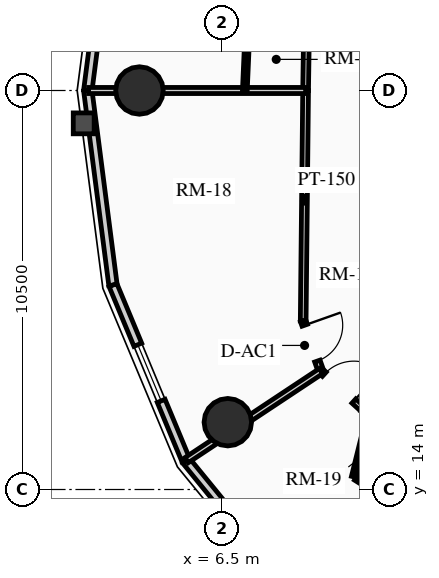
"""IFC4 building model, lengths in metres.
Left out: names, types, materials, properties, quantities, classifications, styles, units other than length and angle.
Written with IfcOpenShell. Run it as: python <this file> out.ifc"""

import sys

from ifc_helpers import new_model, si_unit, direction, frame, frame_2d, origin, origin_2d, place, context, subcontext, project, spatial, rectangle, circle, extrude, source, transform, mapped, element, fill, save


model = new_model("IFC4")
c1 = context("Model", 3, precision=1e-05, world=origin(), true_north=direction((0.0, 1.0)))
c2 = subcontext(c1, "Body", "Model", "MODEL_VIEW")
j1 = project(units=[si_unit("LENGTHUNIT", "METRE"), si_unit("PLANEANGLEUNIT", "RADIAN")], contexts=[c1])
p1 = place(None, origin())
s1 = spatial("IfcSite", under=j1, at=p1, CompositionType="ELEMENT")
p2 = place(p1, origin())
s2 = spatial("IfcBuilding", under=s1, at=p2, CompositionType="ELEMENT")
p3 = place(p2, frame((0.0, 0.0, 183.61)))
s3 = spatial("IfcBuildingStorey", under=s2, at=p3, CompositionType="ELEMENT", Elevation=183.61)
for number, where, z_axis, x_axis in (
    (1, (4.328, 24.5, 0.0), (0.0, 0.0, 1.0), (1.0, 0.0, 0.0)),
    (2, (6.653, 15.771, 0.0), (0.0, 0.0, 1.0), (1.0, 0.0, 0.0)),
):
    element("IfcColumn", number, at=place(p3, frame(where, z_axis=z_axis, x_axis=x_axis)), inside=s3, PredefinedType="USERDEFINED", context=c2, shape_type="SweptSolid", body=[
        extrude(circle(Radius=0.625, at=origin_2d()), origin(), (0.0, 0.0, 1.0), 2.91),
    ])
p4 = place(p3, frame((2.969, 24.5, 0.0), z_axis=(0.0, 0.0, 1.0), x_axis=(0.128287912609, 0.991736966881, 0.0)))
e3 = element("IfcWall", 3, at=p4, inside=s3, PredefinedType="SOLIDWALL", context=c2, shape_type="SweptSolid", body=[
    extrude(rectangle(XDim=5.163, YDim=0.22, at=frame_2d((2.582, 0.0))), origin(), (0.0, 0.0, 1.0), 2.245),
])
m1 = source(origin(), c2, "Body", "SweptSolid", [
    extrude(rectangle(XDim=1.6, YDim=1.3, at=frame_2d((0.8, 0.65))), frame((0.0, 0.12, 0.0), z_axis=(0.0, -1.0, 0.0), x_axis=(1.0, 0.0, 0.0)), (0.0, 0.0, 1.0), 0.24),
])
p5 = place(p4, frame((1.782, 0.0, 0.65)))
e4 = element("IfcOpeningElement", 4, at=p5, cuts=e3, PredefinedType="OPENING", context=c2, shape_type="MappedRepresentation", body=[
    mapped(m1, transform((0.0, 0.0, 0.0), x_axis=(1.0, 0.0, 0.0), y_axis=(0.0, 1.0, 0.0), z_axis=(0.0, 0.0, 1.0), scale=1.0)),
])
p6 = place(p3, frame((3.631, 19.38, 0.0), z_axis=(0.0, 0.0, 1.0), x_axis=(-0.128287912609, 0.991736966881, 0.0)))
e5 = element("IfcWall", 5, at=p6, inside=s3, PredefinedType="SOLIDWALL", context=c2, shape_type="SweptSolid", body=[
    extrude(rectangle(XDim=5.163, YDim=0.22, at=frame_2d((2.582, 0.0))), origin(), (0.0, 0.0, 1.0), 2.245),
])
p7 = place(p3, frame((5.553, 14.76, 0.0), z_axis=(0.0, 0.0, 1.0), x_axis=(-0.384144094086, 0.923273152961, 0.0)))
e6 = element("IfcWall", 6, at=p7, inside=s3, PredefinedType="SOLIDWALL", context=c2, shape_type="SweptSolid", body=[
    extrude(rectangle(XDim=5.003, YDim=0.22, at=frame_2d((2.501, 0.0))), origin(), (0.0, 0.0, 1.0), 2.245),
])
p8 = place(p7, frame((1.702, 0.0, 0.65)))
e7 = element("IfcOpeningElement", 7, at=p8, cuts=e6, PredefinedType="OPENING", context=c2, shape_type="MappedRepresentation", body=[
    mapped(m1, transform((0.0, 0.0, 0.0), x_axis=(1.0, 0.0, 0.0), y_axis=(0.0, 1.0, 0.0), z_axis=(0.0, 0.0, 1.0), scale=1.0)),
])
p9 = place(p3, frame((8.547, 11.094, 0.0), z_axis=(0.0, 0.0, 1.0), x_axis=(-0.632470615287, 0.774584353572, 0.0)))
e8 = element("IfcWall", 8, at=p9, inside=s3, PredefinedType="SOLIDWALL", context=c2, shape_type="SweptSolid", body=[
    extrude(rectangle(XDim=4.733, YDim=0.22, at=frame_2d((2.366, 0.0))), origin(), (0.0, 0.0, 1.0), 2.245),
])
p10 = place(p3, frame((8.791, 30.446, 0.0), z_axis=(0.0, 0.0, 1.0), x_axis=(-0.015230619426, -0.999884007389, 0.0)))
e9 = element("IfcWall", 9, at=p10, inside=s3, PredefinedType="PARTITIONING", context=c2, shape_type="SweptSolid", body=[
    extrude(rectangle(XDim=5.947, YDim=0.15, at=frame_2d((2.974, 0.0))), origin(), (0.0, 0.0, 1.0), 2.675),
])
p11 = place(p3, frame((8.7, 24.5, 0.0), z_axis=(0.0, 0.0, 1.0), x_axis=(-0.010507512335, -0.999944794568, 0.0)))
e10 = element("IfcWall", 10, at=p11, inside=s3, PredefinedType="PARTITIONING", context=c2, shape_type="SweptSolid", body=[
    extrude(rectangle(XDim=6.064, YDim=0.15, at=frame_2d((3.032, 0.0))), origin(), (0.0, 0.0, 1.0), 2.245),
])
p12 = place(p3, frame((8.636, 18.436, 0.0), z_axis=(0.0, 0.0, 1.0), x_axis=(0.333211866524, -0.942851977782, 0.0)))
e11 = element("IfcWall", 11, at=p12, inside=s3, PredefinedType="PARTITIONING", context=c2, shape_type="SweptSolid", body=[
    extrude(rectangle(XDim=1.402, YDim=0.15, at=frame_2d((0.701, 0.0))), origin(), (0.0, 0.0, 1.0), 2.245),
])
m2 = source(origin(), c2, "Body", "SweptSolid", [
    extrude(rectangle(XDim=1.0, YDim=2.015, at=frame_2d((0.5, 1.007))), frame((0.0, 0.085, 0.0), z_axis=(0.0, -1.0, 0.0), x_axis=(1.0, 0.0, 0.0)), (0.0, 0.0, 1.0), 0.17),
])
p13 = place(p12, frame((0.12, 0.0, 0.0)))
e12 = element("IfcOpeningElement", 12, at=p13, cuts=e11, PredefinedType="OPENING", context=c2, shape_type="MappedRepresentation", body=[
    mapped(m2, transform((0.0, 0.0, 0.0), x_axis=(1.0, 0.0, 0.0), y_axis=(0.0, 1.0, 0.0), z_axis=(0.0, 0.0, 1.0), scale=1.0)),
])
p14 = place(p3, frame((9.103, 17.115, 0.0), z_axis=(0.0, 0.0, 1.0), x_axis=(0.740186897911, -0.672401186912, 0.0)))
e13 = element("IfcWall", 13, at=p14, inside=s3, PredefinedType="PARTITIONING", context=c2, shape_type="SweptSolid", body=[
    extrude(rectangle(XDim=1.477, YDim=0.15, at=frame_2d((0.738, 0.0))), origin(), (0.0, 0.0, 1.0), 2.245),
])
m3 = source(origin(), c2, "Body", "SweptSolid", [
    extrude(rectangle(XDim=1.05, YDim=2.015, at=frame_2d((0.525, 1.007))), frame((0.0, 0.085, 0.0), z_axis=(0.0, -1.0, 0.0), x_axis=(1.0, 0.0, 0.0)), (0.0, 0.0, 1.0), 0.17),
])
p15 = place(p14, frame((0.12, 0.0, 0.0)))
e14 = element("IfcOpeningElement", 14, at=p15, cuts=e13, PredefinedType="OPENING", context=c2, shape_type="MappedRepresentation", body=[
    mapped(m3, transform((0.0, 0.0, 0.0), x_axis=(1.0, 0.0, 0.0), y_axis=(0.0, 1.0, 0.0), z_axis=(0.0, 0.0, 1.0), scale=1.0)),
])
p16 = place(p3, frame((8.7, 24.5, 0.0), z_axis=(0.0, 0.0, 1.0), x_axis=(-1.0, 0.0, 0.0)))
e15 = element("IfcWall", 15, at=p16, inside=s3, PredefinedType="PARTITIONING", context=c2, shape_type="SweptSolid", body=[
    extrude(rectangle(XDim=5.711, YDim=0.16, at=frame_2d((2.855, 0.0))), origin(), (0.0, 0.0, 1.0), 2.245),
])
p17 = place(p3, frame((9.103, 17.115, 0.0), z_axis=(0.0, 0.0, 1.0), x_axis=(-0.833535637115, -0.552465692745, 0.0)))
e16 = element("IfcWall", 16, at=p17, inside=s3, PredefinedType="PARTITIONING", context=c2, shape_type="SweptSolid", body=[
    extrude(rectangle(XDim=4.24, YDim=0.16, at=frame_2d((2.12, 0.0))), origin(), (0.0, 0.0, 1.0), 2.245),
])
p18 = place(p3, frame((7.351, 30.213, 0.0), z_axis=(0.0, 0.0, 1.0), x_axis=(-0.043800331293, -0.999040304982, 0.0)))
e17 = element("IfcWall", 17, at=p18, inside=s3, PredefinedType="PARTITIONING", context=c2, shape_type="SweptSolid", body=[
    extrude(rectangle(XDim=5.719, YDim=0.125, at=frame_2d((2.859, 0.0))), origin(), (0.0, 0.0, 1.0), 2.675),
])
p19 = place(p3, frame((10.343, 15.847, 0.0), z_axis=(0.0, 0.0, 1.0), x_axis=(-0.240988864291, -0.970527880737, 0.0)))
e18 = element("IfcWall", 18, at=p19, inside=s3, PredefinedType="PARTITIONING", context=c2, shape_type="SweptSolid", body=[
    extrude(rectangle(XDim=1.56, YDim=0.125, at=frame_2d((0.78, 0.0))), origin(), (0.0, 0.0, 1.0), 2.245),
])
p20 = place(p3, frame((10.02, 14.299, 0.0), z_axis=(0.0, 0.0, 1.0), x_axis=(0.846015763056, -0.533157883427, 0.0)))
e19 = element("IfcWall", 19, at=p20, inside=s3, PredefinedType="PARTITIONING", context=c2, shape_type="SweptSolid", body=[
    extrude(rectangle(XDim=1.991, YDim=0.125, at=frame_2d((0.996, 0.0))), origin(), (0.0, 0.0, 1.0), 2.675),
])
m4 = source(origin(), c2, "Body", "SweptSolid", [
    extrude(rectangle(XDim=0.9, YDim=2.005, at=frame_2d((0.45, 1.002))), frame((0.0, 0.073, 0.0), z_axis=(0.0, -1.0, 0.0), x_axis=(1.0, 0.0, 0.0)), (0.0, 0.0, 1.0), 0.145),
])
p21 = place(p20, frame((0.439, 0.0, 0.0)))
e20 = element("IfcOpeningElement", 20, at=p21, cuts=e19, PredefinedType="OPENING", context=c2, shape_type="MappedRepresentation", body=[
    mapped(m4, transform((0.0, 0.0, 0.0), x_axis=(1.0, 0.0, 0.0), y_axis=(0.0, 1.0, 0.0), z_axis=(0.0, 0.0, 1.0), scale=1.0)),
])
m5 = source(origin(), c2, "Body", "SweptSolid", [
    extrude(rectangle(XDim=1.6, YDim=1.3, at=frame_2d((0.8, 0.65))), frame((0.0, 0.03, 0.0), z_axis=(0.0, -1.0, 0.0), x_axis=(1.0, 0.0, 0.0)), (0.0, 0.0, 1.0), 0.06),
])
p22 = place(p8, origin())
e21 = element("IfcWindow", 21, at=p22, inside=s3, PartitioningType="SINGLE_PANEL", PredefinedType="WINDOW", context=c2, shape_type="MappedRepresentation", body=[
    mapped(m5, transform((0.0, 0.0, 0.0), x_axis=(1.0, 0.0, 0.0), y_axis=(0.0, 1.0, 0.0), z_axis=(0.0, 0.0, 1.0), scale=1.0)),
])
fill(e7, e21)
m6 = source(origin(), c2, "Body", "SweptSolid", [
    extrude(rectangle(XDim=1.0, YDim=2.015, at=frame_2d((0.5, 1.007))), frame((0.0, 0.025, 0.0), z_axis=(0.0, -1.0, 0.0), x_axis=(1.0, 0.0, 0.0)), (0.0, 0.0, 1.0), 0.05),
])
p23 = place(p13, origin())
e22 = element("IfcDoor", 22, at=p23, inside=s3, OperationType="SINGLE_SWING_LEFT", PredefinedType="DOOR", context=c2, shape_type="MappedRepresentation", body=[
    mapped(m6, transform((0.0, 0.0, 0.0), x_axis=(1.0, 0.0, 0.0), y_axis=(0.0, 1.0, 0.0), z_axis=(0.0, 0.0, 1.0), scale=1.0)),
])
fill(e12, e22)
m7 = source(origin(), c2, "Body", "SweptSolid", [
    extrude(rectangle(XDim=1.05, YDim=2.015, at=frame_2d((0.525, 1.007))), frame((0.0, 0.025, 0.0), z_axis=(0.0, -1.0, 0.0), x_axis=(1.0, 0.0, 0.0)), (0.0, 0.0, 1.0), 0.05),
])
p24 = place(p15, origin())
e23 = element("IfcDoor", 23, at=p24, inside=s3, OperationType="SINGLE_SWING_RIGHT", PredefinedType="DOOR", context=c2, shape_type="MappedRepresentation", body=[
    mapped(m7, transform((0.0, 0.0, 0.0), x_axis=(1.0, 0.0, 0.0), y_axis=(0.0, 1.0, 0.0), z_axis=(0.0, 0.0, 1.0), scale=1.0)),
])
fill(e14, e23)
save(model, sys.argv[1])
